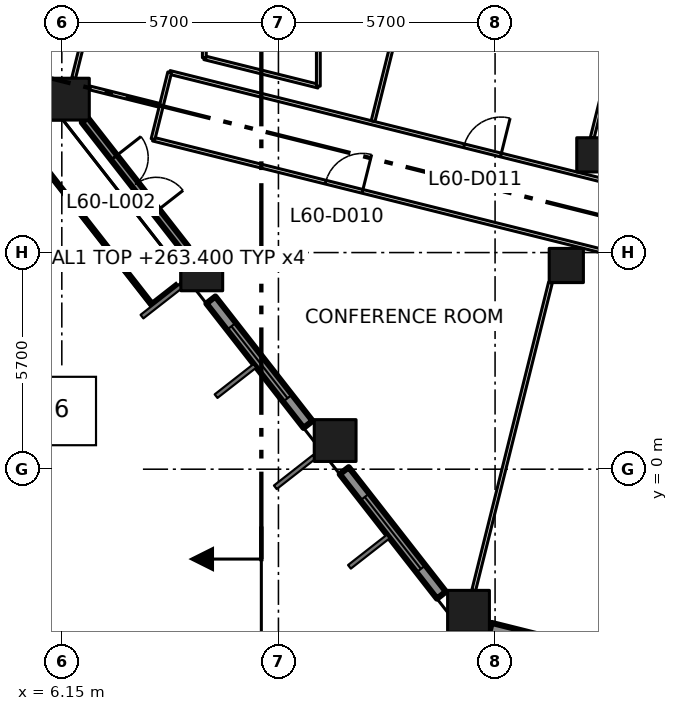
"""IFC4 building model, lengths in metres.
Left out: names, types, materials, properties, quantities, classifications, styles, units other than length and angle.
Written with IfcOpenShell. Run it as: python <this file> out.ifc"""

import sys

from ifc_helpers import new_model, si_unit, direction, frame, frame_2d, origin, origin_2d, place, context, subcontext, project, spatial, rectangle, extrude, element, fill, save


model = new_model("IFC4")
c1 = context("Model", 3, precision=1e-05, world=origin(), true_north=direction((0.0, 1.0)))
c2 = subcontext(c1, "Body", "Model", "MODEL_VIEW")
j1 = project(units=[si_unit("LENGTHUNIT", "METRE"), si_unit("PLANEANGLEUNIT", "RADIAN")], contexts=[c1])
p1 = place(None, origin())
s1 = spatial("IfcSite", under=j1, at=p1, CompositionType="ELEMENT")
p2 = place(p1, origin())
s2 = spatial("IfcBuilding", under=s1, at=p2, CompositionType="ELEMENT")
p3 = place(p2, frame((0.0, 0.0, 263.4)))
s3 = spatial("IfcBuildingStorey", under=s2, at=p3, CompositionType="ELEMENT", Elevation=263.4)
for number, where, z_axis, x_axis in (
    (1, (16.851, -3.738, 0.0), (0.0, 0.0, 1.0), (1.0, 0.0, 0.0)),
    (2, (13.342, 0.754, 0.0), (0.0, 0.0, 1.0), (1.0, 0.0, 0.0)),
    (3, (9.833, 5.245, 0.0), (0.0, 0.0, 1.0), (1.0, 0.0, 0.0)),
    (4, (6.323, 9.737, 0.0), (0.0, 0.0, 1.0), (1.0, 0.0, 0.0)),
):
    element("IfcColumn", number, at=place(p3, frame(where, z_axis=z_axis, x_axis=x_axis)), inside=s3, PredefinedType="COLUMN", context=c2, shape_type="SweptSolid", body=[
        extrude(rectangle(XDim=1.1, YDim=1.1, at=origin_2d()), origin(), (0.0, 0.0, 1.0), 4.2),
    ])
for number, where, z_axis, x_axis in (
    (5, (19.424, 5.36, 0.0), (0.0, 0.0, 1.0), (1.0, 0.0, 0.0)),
    (6, (20.149, 8.271, 0.0), (0.0, 0.0, 1.0), (1.0, 0.0, 0.0)),
):
    element("IfcColumn", number, at=place(p3, frame(where, z_axis=z_axis, x_axis=x_axis)), inside=s3, PredefinedType="COLUMN", context=c2, shape_type="SweptSolid", body=[
        extrude(rectangle(XDim=0.9, YDim=0.9, at=origin_2d()), origin(), (0.0, 0.0, 1.0), 4.2),
    ])
p4 = place(p3, frame((6.754, 9.187, 0.0), z_axis=(0.0, 0.0, 1.0), x_axis=(0.615514142447, -0.78812584049, 0.0)))
e7 = element("IfcWall", 7, at=p4, inside=s3, PredefinedType="SOLIDWALL", context=c2, shape_type="SweptSolid", body=[
    extrude(rectangle(XDim=4.304, YDim=0.2, at=frame_2d((2.152, 0.0))), origin(), (0.0, 0.0, 1.0), 3.15),
])
p5 = place(p4, frame((1.252, 0.0, 0.0)))
e8 = element("IfcOpeningElement", 8, at=p5, cuts=e7, PredefinedType="OPENING", context=c2, shape_type="SweptSolid", body=[
    extrude(rectangle(XDim=1.8, YDim=2.9, at=frame_2d((0.9, 1.45))), frame((0.0, 0.11, 0.0), z_axis=(0.0, -1.0, 0.0), x_axis=(1.0, 0.0, 0.0)), (0.0, 0.0, 1.0), 0.22),
])
p6 = place(p3, frame((10.072, 4.452, 0.0), z_axis=(0.0, 0.0, 1.0), x_axis=(0.615660006568, -0.788011901124, 0.0)))
e9 = element("IfcWall", 9, at=p6, inside=s3, PredefinedType="SOLIDWALL", context=c2, shape_type="SweptSolid", body=[
    extrude(rectangle(XDim=4.155, YDim=0.3, at=frame_2d((2.077, 0.0))), origin(), (0.0, 0.0, 1.0), 3.15),
])
p7 = place(p6, frame((0.878, 0.0, 0.8)))
e10 = element("IfcOpeningElement", 10, at=p7, cuts=e9, PredefinedType="OPENING", context=c2, shape_type="SweptSolid", body=[
    extrude(rectangle(XDim=2.4, YDim=2.1, at=frame_2d((1.2, 1.05))), frame((0.0, 0.16, 0.0), z_axis=(0.0, -1.0, 0.0), x_axis=(1.0, 0.0, 0.0)), (0.0, 0.0, 1.0), 0.32),
])
p8 = place(p3, frame((13.581, -0.039, 0.0), z_axis=(0.0, 0.0, 1.0), x_axis=(0.615545986363, -0.788100969846, 0.0)))
e11 = element("IfcWall", 11, at=p8, inside=s3, PredefinedType="SOLIDWALL", context=c2, shape_type="SweptSolid", body=[
    extrude(rectangle(XDim=4.156, YDim=0.3, at=frame_2d((2.078, 0.0))), origin(), (0.0, 0.0, 1.0), 3.15),
])
p9 = place(p8, frame((0.878, 0.0, 0.8)))
e12 = element("IfcOpeningElement", 12, at=p9, cuts=e11, PredefinedType="OPENING", context=c2, shape_type="SweptSolid", body=[
    extrude(rectangle(XDim=2.4, YDim=2.1, at=frame_2d((1.2, 1.05))), frame((0.0, 0.16, 0.0), z_axis=(0.0, -1.0, 0.0), x_axis=(1.0, 0.0, 0.0)), (0.0, 0.0, 1.0), 0.32),
])
p10 = place(p3, frame((17.425, -4.19, 0.0), z_axis=(0.0, 0.0, 1.0), x_axis=(0.970270592847, -0.242022677978, 0.0)))
e13 = element("IfcWall", 13, at=p10, inside=s3, PredefinedType="SOLIDWALL", context=c2, shape_type="SweptSolid", body=[
    extrude(rectangle(XDim=4.368, YDim=0.3, at=frame_2d((2.184, 0.0))), origin(), (0.0, 0.0, 1.0), 3.15),
])
p11 = place(p10, frame((0.983, 0.0, 0.8)))
e14 = element("IfcOpeningElement", 14, at=p11, cuts=e13, PredefinedType="OPENING", context=c2, shape_type="SweptSolid", body=[
    extrude(rectangle(XDim=2.4, YDim=2.1, at=frame_2d((1.2, 1.05))), frame((0.0, 0.16, 0.0), z_axis=(0.0, -1.0, 0.0), x_axis=(1.0, 0.0, 0.0)), (0.0, 0.0, 1.0), 0.32),
])
p12 = place(p3, frame((8.55, 8.685, 0.0), z_axis=(0.0, 0.0, 1.0), x_axis=(0.970298026101, -0.241912671319, 0.0)))
e15 = element("IfcWall", 15, at=p12, inside=s3, PredefinedType="PARTITIONING", context=c2, shape_type="SweptSolid", body=[
    extrude(rectangle(XDim=51.275, YDim=0.1, at=frame_2d((25.637, 0.0))), origin(), (0.0, 0.0, 1.0), 3.9),
])
p13 = place(p12, frame((35.94, 0.0, 0.0)))
e16 = element("IfcOpeningElement", 16, at=p13, cuts=e15, PredefinedType="OPENING", context=c2, shape_type="SweptSolid", body=[
    extrude(rectangle(XDim=1.8, YDim=2.1, at=frame_2d((0.9, 1.05))), frame((0.0, 0.06, 0.0), z_axis=(0.0, -1.0, 0.0), x_axis=(1.0, 0.0, 0.0)), (0.0, 0.0, 1.0), 0.12),
])
p14 = place(p12, frame((41.34, 0.0, 0.0)))
e17 = element("IfcOpeningElement", 17, at=p14, cuts=e15, PredefinedType="OPENING", context=c2, shape_type="SweptSolid", body=[
    extrude(rectangle(XDim=1.0, YDim=2.1, at=frame_2d((0.5, 1.05))), frame((0.0, 0.06, 0.0), z_axis=(0.0, -1.0, 0.0), x_axis=(1.0, 0.0, 0.0)), (0.0, 0.0, 1.0), 0.12),
])
p15 = place(p12, frame((47.64, 0.0, 0.0)))
e18 = element("IfcOpeningElement", 18, at=p15, cuts=e15, PredefinedType="OPENING", context=c2, shape_type="SweptSolid", body=[
    extrude(rectangle(XDim=1.0, YDim=2.1, at=frame_2d((0.5, 1.05))), frame((0.0, 0.06, 0.0), z_axis=(0.0, -1.0, 0.0), x_axis=(1.0, 0.0, 0.0)), (0.0, 0.0, 1.0), 0.12),
])
p16 = place(p12, frame((18.639, 0.0, 0.0)))
e19 = element("IfcOpeningElement", 19, at=p16, cuts=e15, PredefinedType="OPENING", context=c2, shape_type="SweptSolid", body=[
    extrude(rectangle(XDim=1.8, YDim=2.1, at=frame_2d((0.9, 1.05))), frame((0.0, 0.06, 0.0), z_axis=(0.0, -1.0, 0.0), x_axis=(1.0, 0.0, 0.0)), (0.0, 0.0, 1.0), 0.12),
])
p17 = place(p12, frame((24.339, 0.0, 0.0)))
e20 = element("IfcOpeningElement", 20, at=p17, cuts=e15, PredefinedType="OPENING", context=c2, shape_type="SweptSolid", body=[
    extrude(rectangle(XDim=1.0, YDim=2.1, at=frame_2d((0.5, 1.05))), frame((0.0, 0.06, 0.0), z_axis=(0.0, -1.0, 0.0), x_axis=(1.0, 0.0, 0.0)), (0.0, 0.0, 1.0), 0.12),
])
p18 = place(p12, frame((4.68, 0.0, 0.0)))
e21 = element("IfcOpeningElement", 21, at=p18, cuts=e15, PredefinedType="OPENING", context=c2, shape_type="SweptSolid", body=[
    extrude(rectangle(XDim=1.0, YDim=2.1, at=frame_2d((0.5, 1.05))), frame((0.0, 0.06, 0.0), z_axis=(0.0, -1.0, 0.0), x_axis=(1.0, 0.0, 0.0)), (0.0, 0.0, 1.0), 0.12),
])
p19 = place(p3, frame((8.988, 10.44, 0.0), z_axis=(0.0, 0.0, 1.0), x_axis=(0.970301223092, -0.241899848006, 0.0)))
e22 = element("IfcWall", 22, at=p19, inside=s3, PredefinedType="PARTITIONING", context=c2, shape_type="SweptSolid", body=[
    extrude(rectangle(XDim=19.879, YDim=0.1, at=frame_2d((9.94, 0.0))), origin(), (0.0, 0.0, 1.0), 3.9),
])
p20 = place(p19, frame((18.083, 0.0, 0.0)))
e23 = element("IfcOpeningElement", 23, at=p20, cuts=e22, PredefinedType="OPENING", context=c2, shape_type="SweptSolid", body=[
    extrude(rectangle(XDim=1.0, YDim=2.1, at=frame_2d((0.5, 1.05))), frame((0.0, 0.06, 0.0), z_axis=(0.0, -1.0, 0.0), x_axis=(1.0, 0.0, 0.0)), (0.0, 0.0, 1.0), 0.12),
])
p21 = place(p19, frame((7.983, 0.0, 0.0)))
e24 = element("IfcOpeningElement", 24, at=p21, cuts=e22, PredefinedType="OPENING", context=c2, shape_type="SweptSolid", body=[
    extrude(rectangle(XDim=1.0, YDim=2.1, at=frame_2d((0.5, 1.05))), frame((0.0, 0.06, 0.0), z_axis=(0.0, -1.0, 0.0), x_axis=(1.0, 0.0, 0.0)), (0.0, 0.0, 1.0), 0.12),
])
p22 = place(p19, frame((13.483, 0.0, 0.0)))
e25 = element("IfcOpeningElement", 25, at=p22, cuts=e22, PredefinedType="OPENING", context=c2, shape_type="SweptSolid", body=[
    extrude(rectangle(XDim=1.0, YDim=2.1, at=frame_2d((0.5, 1.05))), frame((0.0, 0.06, 0.0), z_axis=(0.0, -1.0, 0.0), x_axis=(1.0, 0.0, 0.0)), (0.0, 0.0, 1.0), 0.12),
])
p23 = place(p3, frame((8.988, 10.44, 0.0), z_axis=(0.0, 0.0, 1.0), x_axis=(-0.242154485745, -0.970237705428, 0.0)))
e26 = element("IfcWall", 26, at=p23, inside=s3, PredefinedType="PARTITIONING", context=c2, shape_type="SweptSolid", body=[
    extrude(rectangle(XDim=1.809, YDim=0.1, at=frame_2d((0.904, 0.0))), origin(), (0.0, 0.0, 1.0), 3.9),
])
p24 = place(p3, frame((9.9, 10.826, 0.0), z_axis=(0.0, 0.0, 1.0), x_axis=(0.970290953223, -0.241941038466, 0.0)))
e27 = element("IfcWall", 27, at=p24, inside=s3, PredefinedType="PARTITIONING", context=c2, shape_type="SweptSolid", body=[
    extrude(rectangle(XDim=3.092, YDim=0.1, at=frame_2d((1.546, 0.0))), origin(), (0.0, 0.0, 1.0), 3.9),
])
p25 = place(p3, frame((9.9, 12.2, 0.0), z_axis=(0.0, 0.0, 1.0), x_axis=(0.0, -1.0, 0.0)))
e28 = element("IfcWall", 28, at=p25, inside=s3, PredefinedType="PARTITIONING", context=c2, shape_type="SweptSolid", body=[
    extrude(rectangle(XDim=1.374, YDim=0.1, at=frame_2d((0.687, 0.0))), origin(), (0.0, 0.0, 1.0), 3.9),
])
p26 = place(p3, frame((12.9, 10.078, 0.0), z_axis=(0.0, 0.0, 1.0), x_axis=(0.0, 1.0, 0.0)))
e29 = element("IfcWall", 29, at=p26, inside=s3, PredefinedType="PARTITIONING", context=c2, shape_type="SweptSolid", body=[
    extrude(rectangle(XDim=4.022, YDim=0.1, at=frame_2d((2.011, 0.0))), origin(), (0.0, 0.0, 1.0), 3.9),
])
p27 = place(p26, frame((1.48, 0.0, 0.0)))
e30 = element("IfcOpeningElement", 30, at=p27, cuts=e29, PredefinedType="OPENING", context=c2, shape_type="SweptSolid", body=[
    extrude(rectangle(XDim=1.0, YDim=2.1, at=frame_2d((0.5, 1.05))), frame((0.0, 0.06, 0.0), z_axis=(0.0, -1.0, 0.0), x_axis=(1.0, 0.0, 0.0)), (0.0, 0.0, 1.0), 0.12),
])
p28 = place(p3, frame((6.922, 12.138, 0.0), z_axis=(0.0, 0.0, 1.0), x_axis=(-0.242264600824, -0.970210215978, 0.0)))
e31 = element("IfcWall", 31, at=p28, inside=s3, PredefinedType="PARTITIONING", context=c2, shape_type="SweptSolid", body=[
    extrude(rectangle(XDim=1.908, YDim=0.1, at=frame_2d((0.954, 0.0))), origin(), (0.0, 0.0, 1.0), 3.9),
])
p29 = place(p3, frame((8.72, 9.574, 0.0), z_axis=(0.0, 0.0, 1.0), x_axis=(-0.970240497311, 0.242143299263, 0.0)))
e32 = element("IfcWall", 32, at=p29, inside=s3, PredefinedType="PARTITIONING", context=c2, shape_type="SweptSolid", body=[
    extrude(rectangle(XDim=1.904, YDim=0.1, at=frame_2d((0.952, 0.0))), origin(), (0.0, 0.0, 1.0), 3.9),
])
p30 = place(p3, frame((14.34, 9.158, 0.0), z_axis=(0.0, 0.0, 1.0), x_axis=(0.241870144538, 0.970308627799, 0.0)))
e33 = element("IfcWall", 33, at=p30, inside=s3, PredefinedType="PARTITIONING", context=c2, shape_type="SweptSolid", body=[
    extrude(rectangle(XDim=5.093, YDim=0.1, at=frame_2d((2.547, 0.0))), origin(), (0.0, 0.0, 1.0), 3.9),
])
p31 = place(p3, frame((16.988, -3.188, 0.0), z_axis=(0.0, 0.0, 1.0), x_axis=(0.241922982745, 0.97029545522, 0.0)))
e34 = element("IfcWall", 34, at=p31, inside=s3, PredefinedType="PARTITIONING", context=c2, shape_type="SweptSolid", body=[
    extrude(rectangle(XDim=8.346, YDim=0.1, at=frame_2d((4.173, 0.0))), origin(), (0.0, 0.0, 1.0), 3.9),
])
p32 = place(p3, frame((20.106, 8.721, 0.0), z_axis=(0.0, 0.0, 1.0), x_axis=(0.24190349153, 0.970300314741, 0.0)))
e35 = element("IfcWall", 35, at=p32, inside=s3, PredefinedType="PARTITIONING", context=c2, shape_type="SweptSolid", body=[
    extrude(rectangle(XDim=5.544, YDim=0.1, at=frame_2d((2.772, 0.0))), origin(), (0.0, 0.0, 1.0), 3.9),
])
p33 = place(p5, origin())
e36 = element("IfcDoor", 36, at=p33, inside=s3, OperationType="DOUBLE_DOOR_SINGLE_SWING", PredefinedType="DOOR", context=c2, shape_type="SweptSolid", body=[
    extrude(rectangle(XDim=1.8, YDim=2.9, at=frame_2d((0.9, 1.45))), frame((0.0, 0.025, 0.0), z_axis=(0.0, -1.0, 0.0), x_axis=(1.0, 0.0, 0.0)), (0.0, 0.0, 1.0), 0.05),
])
fill(e8, e36)
p34 = place(p7, origin())
e37 = element("IfcWindow", 37, at=p34, inside=s3, PartitioningType="DOUBLE_PANEL_VERTICAL", PredefinedType="WINDOW", context=c2, shape_type="SweptSolid", body=[
    extrude(rectangle(XDim=2.4, YDim=2.1, at=frame_2d((1.2, 1.05))), frame((0.0, 0.03, 0.0), z_axis=(0.0, -1.0, 0.0), x_axis=(1.0, 0.0, 0.0)), (0.0, 0.0, 1.0), 0.06),
])
fill(e10, e37)
p35 = place(p9, origin())
e38 = element("IfcWindow", 38, at=p35, inside=s3, PartitioningType="DOUBLE_PANEL_VERTICAL", PredefinedType="WINDOW", context=c2, shape_type="SweptSolid", body=[
    extrude(rectangle(XDim=2.4, YDim=2.1, at=frame_2d((1.2, 1.05))), frame((0.0, 0.03, 0.0), z_axis=(0.0, -1.0, 0.0), x_axis=(1.0, 0.0, 0.0)), (0.0, 0.0, 1.0), 0.06),
])
fill(e12, e38)
p36 = place(p18, origin())
e39 = element("IfcDoor", 39, at=p36, inside=s3, OperationType="SINGLE_SWING_RIGHT", PredefinedType="DOOR", context=c2, shape_type="SweptSolid", body=[
    extrude(rectangle(XDim=1.0, YDim=2.1, at=frame_2d((0.5, 1.05))), frame((0.0, 0.025, 0.0), z_axis=(0.0, -1.0, 0.0), x_axis=(1.0, 0.0, 0.0)), (0.0, 0.0, 1.0), 0.05),
])
fill(e21, e39)
p37 = place(p21, origin())
e40 = element("IfcDoor", 40, at=p37, inside=s3, OperationType="SINGLE_SWING_RIGHT", PredefinedType="DOOR", context=c2, shape_type="SweptSolid", body=[
    extrude(rectangle(XDim=1.0, YDim=2.1, at=frame_2d((0.5, 1.05))), frame((0.0, 0.025, 0.0), z_axis=(0.0, -1.0, 0.0), x_axis=(1.0, 0.0, 0.0)), (0.0, 0.0, 1.0), 0.05),
])
fill(e24, e40)
save(model, sys.argv[1])
